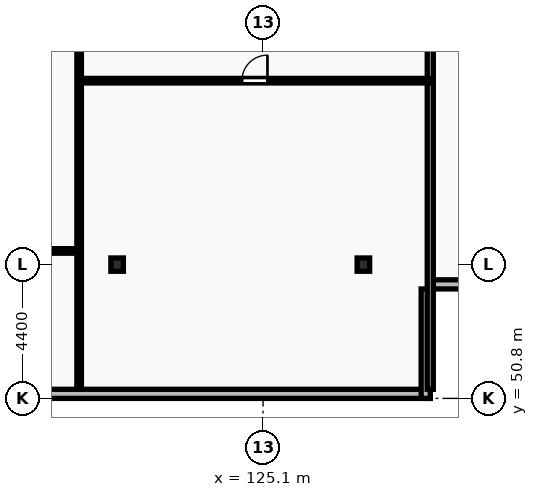
"""IFC4 building model, lengths in metres.
Left out: names, types, materials, properties, quantities, classifications, styles, units other than length and angle.
Written with IfcOpenShell. Run it as: python <this file> out.ifc"""

import sys

from ifc_helpers import new_model, si_unit, direction, frame, frame_2d, origin, origin_2d, place, context, subcontext, project, spatial, rectangle, i_section, extrude, element, fill, save


model = new_model("IFC4")
c1 = context("Model", 3, precision=1e-05, world=origin(), true_north=direction((0.0, 1.0)))
c2 = subcontext(c1, "Body", "Model", "MODEL_VIEW")
j1 = project(units=[si_unit("LENGTHUNIT", "METRE"), si_unit("PLANEANGLEUNIT", "RADIAN")], contexts=[c1])
p1 = place(None, origin())
s1 = spatial("IfcSite", under=j1, at=p1, CompositionType="ELEMENT")
p2 = place(p1, origin())
s2 = spatial("IfcBuilding", under=s1, at=p2, CompositionType="ELEMENT")
p3 = place(p2, frame((0.0, 0.0, 150.1)))
s3 = spatial("IfcBuildingStorey", under=s2, at=p3, CompositionType="ELEMENT", Elevation=150.1)
for number, where, z_axis, x_axis in (
    (1, (120.3, 55.2, 0.0), (0.0, 0.0, 1.0), (1.0, 0.0, 0.0)),
    (2, (128.4, 55.2, 0.0), (0.0, 0.0, 1.0), (1.0, 0.0, 0.0)),
):
    element("IfcColumn", number, at=place(p3, frame(where, z_axis=z_axis, x_axis=x_axis)), inside=s3, PredefinedType="COLUMN", context=c2, shape_type="SweptSolid", body=[
        extrude(i_section(OverallWidth=0.412, OverallDepth=0.437, WebThickness=0.036, FlangeThickness=0.052, FilletRadius=0.015, at=origin_2d()), origin(), (0.0, 0.0, 1.0), 3.6),
    ])
p4 = place(p3, frame((57.6, 50.95, 0.0), z_axis=(0.0, 0.0, 1.0), x_axis=(1.0, 0.0, 0.0)))
e3 = element("IfcWall", 3, at=p4, inside=s3, PredefinedType="STANDARD", context=c2, shape_type="SweptSolid", body=[
    extrude(rectangle(XDim=73.0, YDim=0.3, at=frame_2d((36.5, 0.0))), origin(), (0.0, 0.0, 1.0), 3.31),
])
p5 = place(p4, frame((15.225, 0.0, 0.85)))
e4 = element("IfcOpeningElement", 4, at=p5, cuts=e3, PredefinedType="OPENING", context=c2, shape_type="SweptSolid", body=[
    extrude(rectangle(XDim=1.8, YDim=1.8, at=frame_2d((0.9, 0.9))), frame((0.0, 0.16, 0.0), z_axis=(0.0, -1.0, 0.0), x_axis=(1.0, 0.0, 0.0)), (0.0, 0.0, 1.0), 0.32),
])
p6 = place(p4, frame((58.575, 0.0, 0.85)))
e5 = element("IfcOpeningElement", 5, at=p6, cuts=e3, PredefinedType="OPENING", context=c2, shape_type="SweptSolid", body=[
    extrude(rectangle(XDim=1.8, YDim=1.8, at=frame_2d((0.9, 0.9))), frame((0.0, 0.16, 0.0), z_axis=(0.0, -1.0, 0.0), x_axis=(1.0, 0.0, 0.0)), (0.0, 0.0, 1.0), 0.32),
])
p7 = place(p4, frame((33.45, 0.0, 0.0)))
e6 = element("IfcOpeningElement", 6, at=p7, cuts=e3, PredefinedType="OPENING", context=c2, shape_type="SweptSolid", body=[
    extrude(rectangle(XDim=1.1, YDim=2.1, at=frame_2d((0.55, 1.05))), frame((0.0, 0.16, 0.0), z_axis=(0.0, -1.0, 0.0), x_axis=(1.0, 0.0, 0.0)), (0.0, 0.0, 1.0), 0.32),
])
for number, where, z_axis, x_axis in (
    (7, (130.45, 50.8, 0.0), (0.0, 0.0, 1.0), (0.0, 1.0, 0.0)),
    (8, (130.6, 54.55, 0.0), (0.0, 0.0, 1.0), (1.0, 0.0, 0.0)),
):
    element("IfcWall", number, at=place(p3, frame(where, z_axis=z_axis, x_axis=x_axis)), inside=s3, PredefinedType="STANDARD", context=c2, shape_type="SweptSolid", body=[
        extrude(rectangle(XDim=3.6, YDim=0.3, at=frame_2d((1.8, 0.0))), origin(), (0.0, 0.0, 1.0), 3.31),
    ])
p8 = place(p3, frame((130.6, 51.1, 0.0), z_axis=(0.0, 0.0, 1.0), x_axis=(0.0, 1.0, 0.0)))
e9 = element("IfcWall", 9, at=p8, inside=s3, PredefinedType="PARTITIONING", context=c2, shape_type="SweptSolid", body=[
    extrude(rectangle(XDim=16.1, YDim=0.2, at=frame_2d((8.05, 0.0))), origin(), (0.0, 0.0, 1.0), 3.31),
])
p9 = place(p3, frame((119.05, 61.25, 0.0), z_axis=(0.0, 0.0, 1.0), x_axis=(1.0, 0.0, 0.0)))
e10 = element("IfcWall", 10, at=p9, inside=s3, PredefinedType="PARTITIONING", context=c2, shape_type="SweptSolid", body=[
    extrude(rectangle(XDim=11.55, YDim=0.15, at=frame_2d((5.775, 0.0))), origin(), (0.0, 0.0, 1.0), 3.31),
])
p10 = place(p9, frame((5.355, 0.0, 0.0)))
e11 = element("IfcOpeningElement", 11, at=p10, cuts=e10, PredefinedType="OPENING", context=c2, shape_type="SweptSolid", body=[
    extrude(rectangle(XDim=0.84, YDim=2.04, at=frame_2d((0.42, 1.02))), frame((0.0, 0.085, 0.0), z_axis=(0.0, -1.0, 0.0), x_axis=(1.0, 0.0, 0.0)), (0.0, 0.0, 1.0), 0.17),
])
p11 = place(p3, frame((119.05, 51.1, 0.0), z_axis=(0.0, 0.0, 1.0), x_axis=(0.0, 1.0, 0.0)))
e12 = element("IfcWall", 12, at=p11, inside=s3, PredefinedType="PARTITIONING", context=c2, shape_type="SweptSolid", body=[
    extrude(rectangle(XDim=16.05, YDim=0.15, at=frame_2d((8.025, 0.0))), origin(), (0.0, 0.0, 1.0), 3.31),
])
p12 = place(p11, frame((11.3, 0.0, 0.0)))
e13 = element("IfcOpeningElement", 13, at=p12, cuts=e12, PredefinedType="OPENING", context=c2, shape_type="SweptSolid", body=[
    extrude(rectangle(XDim=0.88, YDim=2.06, at=frame_2d((0.44, 1.03))), frame((0.0, 0.085, 0.0), z_axis=(0.0, -1.0, 0.0), x_axis=(1.0, 0.0, 0.0)), (0.0, 0.0, 1.0), 0.17),
])
p13 = place(p3, frame((112.27, 55.65, 0.0), z_axis=(0.0, 0.0, 1.0), x_axis=(1.0, 0.0, 0.0)))
e14 = element("IfcWall", 14, at=p13, inside=s3, PredefinedType="PARTITIONING", context=c2, shape_type="SweptSolid", body=[
    extrude(rectangle(XDim=6.76, YDim=0.15, at=frame_2d((3.38, 0.0))), origin(), (0.0, 0.0, 1.0), 3.31),
])
p14 = place(p13, frame((1.64, 0.0, 0.0)))
e15 = element("IfcOpeningElement", 15, at=p14, cuts=e14, PredefinedType="OPENING", context=c2, shape_type="SweptSolid", body=[
    extrude(rectangle(XDim=0.84, YDim=2.04, at=frame_2d((0.42, 1.02))), frame((0.0, 0.085, 0.0), z_axis=(0.0, -1.0, 0.0), x_axis=(1.0, 0.0, 0.0)), (0.0, 0.0, 1.0), 0.17),
])
p15 = place(p13, frame((3.16, 0.0, 0.0)))
e16 = element("IfcOpeningElement", 16, at=p15, cuts=e14, PredefinedType="OPENING", context=c2, shape_type="SweptSolid", body=[
    extrude(rectangle(XDim=0.88, YDim=2.06, at=frame_2d((0.44, 1.03))), frame((0.0, 0.085, 0.0), z_axis=(0.0, -1.0, 0.0), x_axis=(1.0, 0.0, 0.0)), (0.0, 0.0, 1.0), 0.17),
])
p16 = place(p10, origin())
e17 = element("IfcDoor", 17, at=p16, inside=s3, OperationType="SINGLE_SWING_RIGHT", PredefinedType="DOOR", context=c2, shape_type="SweptSolid", body=[
    extrude(rectangle(XDim=0.84, YDim=2.04, at=frame_2d((0.42, 1.02))), frame((0.0, 0.025, 0.0), z_axis=(0.0, -1.0, 0.0), x_axis=(1.0, 0.0, 0.0)), (0.0, 0.0, 1.0), 0.05),
])
fill(e11, e17)
save(model, sys.argv[1])
